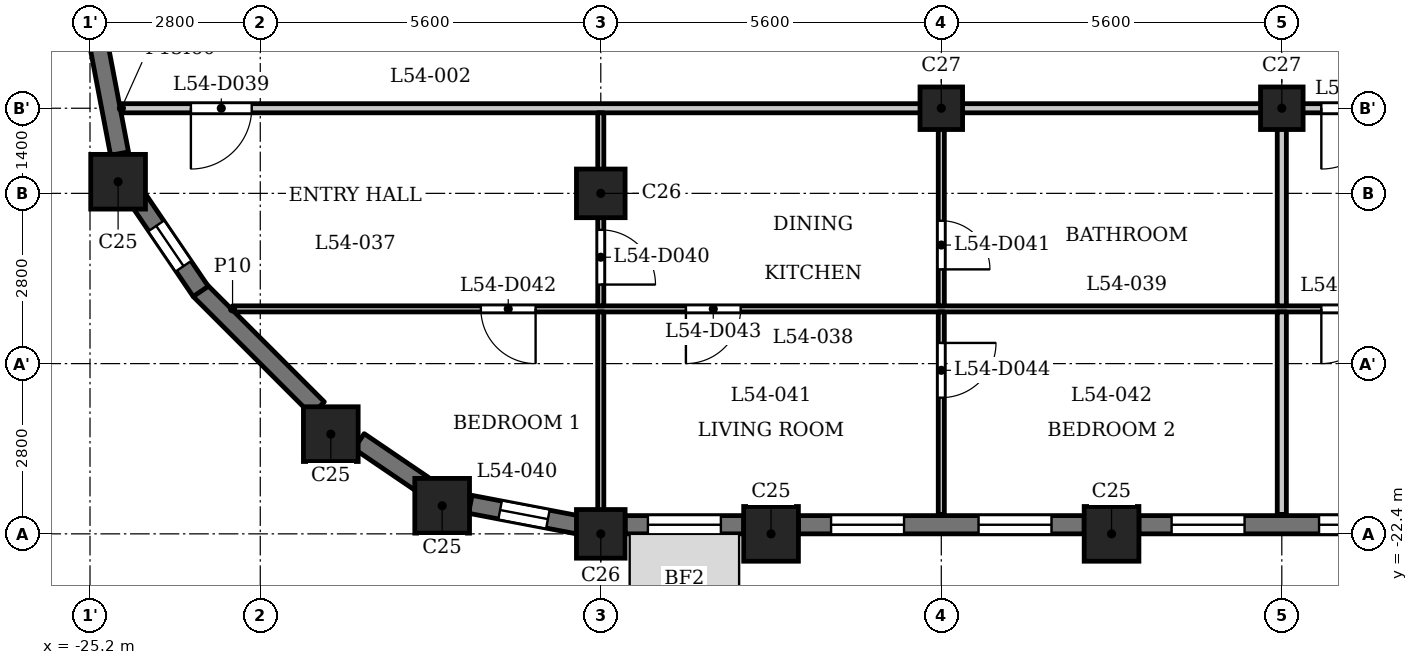
"""IFC4 building model, lengths in metres.
Left out: names, types, materials, properties, quantities, classifications, styles, units other than length and angle.
Written with IfcOpenShell. Run it as: python <this file> out.ifc"""

import sys

from ifc_helpers import new_model, si_unit, direction, frame, frame_2d, origin, origin_2d, place, context, subcontext, project, spatial, rectangle, extrude, element, fill, save


model = new_model("IFC4")
c1 = context("Model", 3, precision=1e-05, world=origin(), true_north=direction((0.0, 1.0)))
c2 = subcontext(c1, "Body", "Model", "MODEL_VIEW")
j1 = project(units=[si_unit("LENGTHUNIT", "METRE"), si_unit("PLANEANGLEUNIT", "RADIAN")], contexts=[c1])
p1 = place(None, origin())
s1 = spatial("IfcSite", under=j1, at=p1, CompositionType="ELEMENT")
p2 = place(p1, origin())
s2 = spatial("IfcBuilding", under=s1, at=p2, CompositionType="ELEMENT")
p3 = place(p2, frame((0.0, 0.0, 209.9)))
s3 = spatial("IfcBuildingStorey", under=s2, at=p3, CompositionType="ELEMENT", Elevation=209.9)
for number, where, z_axis, x_axis in (
    (1, (-19.409, -21.938, 0.0), (0.0, 0.0, 1.0), (1.0, 0.0, 0.0)),
    (2, (-14.0, -22.4, 0.0), (0.0, 0.0, 1.0), (1.0, 0.0, 0.0)),
    (3, (-8.4, -22.4, 0.0), (0.0, 0.0, 1.0), (1.0, 0.0, 0.0)),
    (4, (-24.738, -16.609, 0.0), (0.0, 0.0, 1.0), (1.0, 0.0, 0.0)),
    (5, (-21.24, -20.76, 0.0), (0.0, 0.0, 1.0), (1.0, 0.0, 0.0)),
):
    element("IfcColumn", number, at=place(p3, frame(where, z_axis=z_axis, x_axis=x_axis)), inside=s3, PredefinedType="COLUMN", context=c2, shape_type="SweptSolid", body=[
        extrude(rectangle(XDim=0.9, YDim=0.9, at=origin_2d()), origin(), (0.0, 0.0, 1.0), 3.5),
    ])
for number, where, z_axis, x_axis in (
    (6, (-16.8, -22.4, 0.0), (0.0, 0.0, 1.0), (1.0, 0.0, 0.0)),
    (7, (-16.8, -16.8, 0.0), (0.0, 0.0, 1.0), (1.0, 0.0, 0.0)),
):
    element("IfcColumn", number, at=place(p3, frame(where, z_axis=z_axis, x_axis=x_axis)), inside=s3, PredefinedType="COLUMN", context=c2, shape_type="SweptSolid", body=[
        extrude(rectangle(XDim=0.8, YDim=0.8, at=origin_2d()), origin(), (0.0, 0.0, 1.0), 3.5),
    ])
for number, where, z_axis, x_axis in (
    (8, (-11.2, -15.4, 0.0), (0.0, 0.0, 1.0), (1.0, 0.0, 0.0)),
    (9, (-5.6, -15.4, 0.0), (0.0, 0.0, 1.0), (1.0, 0.0, 0.0)),
):
    element("IfcColumn", number, at=place(p3, frame(where, z_axis=z_axis, x_axis=x_axis)), inside=s3, PredefinedType="COLUMN", context=c2, shape_type="SweptSolid", body=[
        extrude(rectangle(XDim=0.7, YDim=0.7, at=origin_2d()), origin(), (0.0, 0.0, 1.0), 3.5),
    ])
p4 = place(p3, frame((-23.397, -18.391, 0.0), z_axis=(0.0, 0.0, 1.0), x_axis=(0.707106781187, -0.707106781187, 0.0)))
e10 = element("IfcWall", 10, at=p4, inside=s3, PredefinedType="SOLIDWALL", context=c2, shape_type="SweptSolid", body=[
    extrude(rectangle(XDim=2.75, YDim=0.3, at=frame_2d((1.375, 0.0))), origin(), (0.0, 0.0, 1.0), 2.5),
])
p5 = place(p3, frame((-20.775, -20.876, 0.0), z_axis=(0.0, 0.0, 1.0), x_axis=(0.827075824828, -0.562090366388, 0.0)))
e11 = element("IfcWall", 11, at=p5, inside=s3, PredefinedType="SOLIDWALL", context=c2, shape_type="SweptSolid", body=[
    extrude(rectangle(XDim=1.277, YDim=0.3, at=frame_2d((0.638, 0.0))), origin(), (0.0, 0.0, 1.0), 2.5),
])
p6 = place(p3, frame((-18.946, -21.914, 0.0), z_axis=(0.0, 0.0, 1.0), x_axis=(0.98230529033, -0.187286722942, 0.0)))
e12 = element("IfcWall", 12, at=p6, inside=s3, PredefinedType="SOLIDWALL", context=c2, shape_type="SweptSolid", body=[
    extrude(rectangle(XDim=1.799, YDim=0.3, at=frame_2d((0.899, 0.0))), origin(), (0.0, 0.0, 1.0), 2.5),
])
p7 = place(p6, frame((0.5, 0.0, 0.6)))
e13 = element("IfcOpeningElement", 13, at=p7, cuts=e12, PredefinedType="OPENING", context=c2, shape_type="SweptSolid", body=[
    extrude(rectangle(XDim=0.8, YDim=1.55, at=frame_2d((0.4, 0.775))), frame((0.0, 0.16, 0.0), z_axis=(0.0, -1.0, 0.0), x_axis=(1.0, 0.0, 0.0)), (0.0, 0.0, 1.0), 0.32),
])
p8 = place(p3, frame((-16.4, -22.25, 0.0), z_axis=(0.0, 0.0, 1.0), x_axis=(1.0, 0.0, 0.0)))
e14 = element("IfcWall", 14, at=p8, inside=s3, PredefinedType="SOLIDWALL", context=c2, shape_type="SweptSolid", body=[
    extrude(rectangle(XDim=1.95, YDim=0.3, at=frame_2d((0.975, 0.0))), origin(), (0.0, 0.0, 1.0), 2.5),
])
p9 = place(p8, frame((0.375, 0.0, 0.6)))
e15 = element("IfcOpeningElement", 15, at=p9, cuts=e14, PredefinedType="OPENING", context=c2, shape_type="SweptSolid", body=[
    extrude(rectangle(XDim=1.2, YDim=1.55, at=frame_2d((0.6, 0.775))), frame((0.0, 0.16, 0.0), z_axis=(0.0, -1.0, 0.0), x_axis=(1.0, 0.0, 0.0)), (0.0, 0.0, 1.0), 0.32),
])
p10 = place(p3, frame((-13.55, -22.25, 0.0), z_axis=(0.0, 0.0, 1.0), x_axis=(1.0, 0.0, 0.0)))
e16 = element("IfcWall", 16, at=p10, inside=s3, PredefinedType="SOLIDWALL", context=c2, shape_type="SweptSolid", body=[
    extrude(rectangle(XDim=4.7, YDim=0.3, at=frame_2d((2.35, 0.0))), origin(), (0.0, 0.0, 1.0), 2.5),
])
p11 = place(p10, frame((0.538, 0.0, 0.6)))
e17 = element("IfcOpeningElement", 17, at=p11, cuts=e16, PredefinedType="OPENING", context=c2, shape_type="SweptSolid", body=[
    extrude(rectangle(XDim=1.2, YDim=1.55, at=frame_2d((0.6, 0.775))), frame((0.0, 0.16, 0.0), z_axis=(0.0, -1.0, 0.0), x_axis=(1.0, 0.0, 0.0)), (0.0, 0.0, 1.0), 0.32),
])
p12 = place(p10, frame((2.962, 0.0, 0.6)))
e18 = element("IfcOpeningElement", 18, at=p12, cuts=e16, PredefinedType="OPENING", context=c2, shape_type="SweptSolid", body=[
    extrude(rectangle(XDim=1.2, YDim=1.55, at=frame_2d((0.6, 0.775))), frame((0.0, 0.16, 0.0), z_axis=(0.0, -1.0, 0.0), x_axis=(1.0, 0.0, 0.0)), (0.0, 0.0, 1.0), 0.32),
])
p13 = place(p3, frame((-7.95, -22.25, 0.0), z_axis=(0.0, 0.0, 1.0), x_axis=(1.0, 0.0, 0.0)))
e19 = element("IfcWall", 19, at=p13, inside=s3, PredefinedType="SOLIDWALL", context=c2, shape_type="SweptSolid", body=[
    extrude(rectangle(XDim=4.7, YDim=0.3, at=frame_2d((2.35, 0.0))), origin(), (0.0, 0.0, 1.0), 2.5),
])
p14 = place(p13, frame((0.538, 0.0, 0.6)))
e20 = element("IfcOpeningElement", 20, at=p14, cuts=e19, PredefinedType="OPENING", context=c2, shape_type="SweptSolid", body=[
    extrude(rectangle(XDim=1.2, YDim=1.55, at=frame_2d((0.6, 0.775))), frame((0.0, 0.16, 0.0), z_axis=(0.0, -1.0, 0.0), x_axis=(1.0, 0.0, 0.0)), (0.0, 0.0, 1.0), 0.32),
])
p15 = place(p13, frame((2.962, 0.0, 0.6)))
e21 = element("IfcOpeningElement", 21, at=p15, cuts=e19, PredefinedType="OPENING", context=c2, shape_type="SweptSolid", body=[
    extrude(rectangle(XDim=1.2, YDim=1.55, at=frame_2d((0.6, 0.775))), frame((0.0, 0.16, 0.0), z_axis=(0.0, -1.0, 0.0), x_axis=(1.0, 0.0, 0.0)), (0.0, 0.0, 1.0), 0.32),
])
p16 = place(p3, frame((-25.053, -14.372, 0.0), z_axis=(0.0, 0.0, 1.0), x_axis=(0.187348135549, -0.982293579388, 0.0)))
e22 = element("IfcWall", 22, at=p16, inside=s3, PredefinedType="SOLIDWALL", context=c2, shape_type="SweptSolid", body=[
    extrude(rectangle(XDim=1.806, YDim=0.3, at=frame_2d((0.903, 0.0))), origin(), (0.0, 0.0, 1.0), 2.5),
])
p17 = place(p3, frame((-24.394, -16.919, 0.0), z_axis=(0.0, 0.0, 1.0), x_axis=(0.562040093569, -0.827109988588, 0.0)))
e23 = element("IfcWall", 23, at=p17, inside=s3, PredefinedType="SOLIDWALL", context=c2, shape_type="SweptSolid", body=[
    extrude(rectangle(XDim=1.806, YDim=0.3, at=frame_2d((0.903, 0.0))), origin(), (0.0, 0.0, 1.0), 2.5),
])
p18 = place(p17, frame((0.503, 0.0, 0.6)))
e24 = element("IfcOpeningElement", 24, at=p18, cuts=e23, PredefinedType="OPENING", context=c2, shape_type="SweptSolid", body=[
    extrude(rectangle(XDim=0.8, YDim=1.55, at=frame_2d((0.4, 0.775))), frame((0.0, 0.16, 0.0), z_axis=(0.0, -1.0, 0.0), x_axis=(1.0, 0.0, 0.0)), (0.0, 0.0, 1.0), 0.32),
])
p19 = place(p3, frame((-22.856, -18.7, 0.0), z_axis=(0.0, 0.0, 1.0), x_axis=(1.0, 0.0, 0.0)))
e25 = element("IfcWall", 25, at=p19, inside=s3, PredefinedType="PARTITIONING", context=c2, shape_type="SweptSolid", body=[
    extrude(rectangle(XDim=45.711, YDim=0.1, at=frame_2d((22.856, 0.0))), origin(), (0.0, 0.0, 1.0), 3.2),
])
p20 = place(p19, frame((4.084, 0.0, 0.0)))
e26 = element("IfcOpeningElement", 26, at=p20, cuts=e25, PredefinedType="OPENING", context=c2, shape_type="SweptSolid", body=[
    extrude(rectangle(XDim=0.9, YDim=2.1, at=frame_2d((0.45, 1.05))), frame((0.0, 0.06, 0.0), z_axis=(0.0, -1.0, 0.0), x_axis=(1.0, 0.0, 0.0)), (0.0, 0.0, 1.0), 0.12),
])
p21 = place(p19, frame((7.456, 0.0, 0.0)))
e27 = element("IfcOpeningElement", 27, at=p21, cuts=e25, PredefinedType="OPENING", context=c2, shape_type="SweptSolid", body=[
    extrude(rectangle(XDim=0.9, YDim=2.1, at=frame_2d((0.45, 1.05))), frame((0.0, 0.06, 0.0), z_axis=(0.0, -1.0, 0.0), x_axis=(1.0, 0.0, 0.0)), (0.0, 0.0, 1.0), 0.12),
])
p22 = place(p19, frame((23.506, 0.0, 0.0)))
e28 = element("IfcOpeningElement", 28, at=p22, cuts=e25, PredefinedType="OPENING", context=c2, shape_type="SweptSolid", body=[
    extrude(rectangle(XDim=0.8, YDim=2.1, at=frame_2d((0.4, 1.05))), frame((0.0, 0.06, 0.0), z_axis=(0.0, -1.0, 0.0), x_axis=(1.0, 0.0, 0.0)), (0.0, 0.0, 1.0), 0.12),
])
p23 = place(p19, frame((17.906, 0.0, 0.0)))
e29 = element("IfcOpeningElement", 29, at=p23, cuts=e25, PredefinedType="OPENING", context=c2, shape_type="SweptSolid", body=[
    extrude(rectangle(XDim=0.9, YDim=2.1, at=frame_2d((0.45, 1.05))), frame((0.0, 0.06, 0.0), z_axis=(0.0, -1.0, 0.0), x_axis=(1.0, 0.0, 0.0)), (0.0, 0.0, 1.0), 0.12),
])
p24 = place(p19, frame((43.806, 0.0, 0.0)))
e30 = element("IfcOpeningElement", 30, at=p24, cuts=e25, PredefinedType="OPENING", context=c2, shape_type="SweptSolid", body=[
    extrude(rectangle(XDim=0.9, YDim=2.1, at=frame_2d((0.45, 1.05))), frame((0.0, 0.06, 0.0), z_axis=(0.0, -1.0, 0.0), x_axis=(1.0, 0.0, 0.0)), (0.0, 0.0, 1.0), 0.12),
])
p25 = place(p19, frame((34.706, 0.0, 0.0)))
e31 = element("IfcOpeningElement", 31, at=p25, cuts=e25, PredefinedType="OPENING", context=c2, shape_type="SweptSolid", body=[
    extrude(rectangle(XDim=0.9, YDim=2.1, at=frame_2d((0.45, 1.05))), frame((0.0, 0.06, 0.0), z_axis=(0.0, -1.0, 0.0), x_axis=(1.0, 0.0, 0.0)), (0.0, 0.0, 1.0), 0.12),
])
p26 = place(p3, frame((-24.684, -15.4, 0.0), z_axis=(0.0, 0.0, 1.0), x_axis=(1.0, 0.0, 0.0)))
e32 = element("IfcWall", 32, at=p26, inside=s3, PredefinedType="PARTITIONING", context=c2, shape_type="SweptSolid", body=[
    extrude(rectangle(XDim=49.368, YDim=0.15, at=frame_2d((24.684, 0.0))), origin(), (0.0, 0.0, 1.0), 3.2),
])
p27 = place(p26, frame((1.143, 0.0, 0.0)))
e33 = element("IfcOpeningElement", 33, at=p27, cuts=e32, PredefinedType="OPENING", context=c2, shape_type="SweptSolid", body=[
    extrude(rectangle(XDim=1.0, YDim=2.1, at=frame_2d((0.5, 1.05))), frame((0.0, 0.085, 0.0), z_axis=(0.0, -1.0, 0.0), x_axis=(1.0, 0.0, 0.0)), (0.0, 0.0, 1.0), 0.17),
])
p28 = place(p26, frame((19.734, 0.0, 0.0)))
e34 = element("IfcOpeningElement", 34, at=p28, cuts=e32, PredefinedType="OPENING", context=c2, shape_type="SweptSolid", body=[
    extrude(rectangle(XDim=1.0, YDim=2.1, at=frame_2d((0.5, 1.05))), frame((0.0, 0.085, 0.0), z_axis=(0.0, -1.0, 0.0), x_axis=(1.0, 0.0, 0.0)), (0.0, 0.0, 1.0), 0.17),
])
p29 = place(p26, frame((42.134, 0.0, 0.0)))
e35 = element("IfcOpeningElement", 35, at=p29, cuts=e32, PredefinedType="OPENING", context=c2, shape_type="SweptSolid", body=[
    extrude(rectangle(XDim=1.0, YDim=2.1, at=frame_2d((0.5, 1.05))), frame((0.0, 0.085, 0.0), z_axis=(0.0, -1.0, 0.0), x_axis=(1.0, 0.0, 0.0)), (0.0, 0.0, 1.0), 0.17),
])
p30 = place(p3, frame((-16.8, -22.31, 0.0), z_axis=(0.0, 0.0, 1.0), x_axis=(0.0, 1.0, 0.0)))
e36 = element("IfcWall", 36, at=p30, inside=s3, PredefinedType="PARTITIONING", context=c2, shape_type="SweptSolid", body=[
    extrude(rectangle(XDim=3.56, YDim=0.1, at=frame_2d((1.78, 0.0))), origin(), (0.0, 0.0, 1.0), 2.55),
])
p31 = place(p3, frame((-16.8, -18.65, 0.0), z_axis=(0.0, 0.0, 1.0), x_axis=(0.0, 1.0, 0.0)))
e37 = element("IfcWall", 37, at=p31, inside=s3, PredefinedType="PARTITIONING", context=c2, shape_type="SweptSolid", body=[
    extrude(rectangle(XDim=3.175, YDim=0.1, at=frame_2d((1.587, 0.0))), origin(), (0.0, 0.0, 1.0), 2.55),
])
p32 = place(p31, frame((0.35, 0.0, 0.0)))
e38 = element("IfcOpeningElement", 38, at=p32, cuts=e37, PredefinedType="OPENING", context=c2, shape_type="SweptSolid", body=[
    extrude(rectangle(XDim=0.9, YDim=2.1, at=frame_2d((0.45, 1.05))), frame((0.0, 0.06, 0.0), z_axis=(0.0, -1.0, 0.0), x_axis=(1.0, 0.0, 0.0)), (0.0, 0.0, 1.0), 0.12),
])
p33 = place(p3, frame((-11.2, -22.08, 0.0), z_axis=(0.0, 0.0, 1.0), x_axis=(0.0, 1.0, 0.0)))
e39 = element("IfcWall", 39, at=p33, inside=s3, PredefinedType="PARTITIONING", context=c2, shape_type="SweptSolid", body=[
    extrude(rectangle(XDim=3.33, YDim=0.1, at=frame_2d((1.665, 0.0))), origin(), (0.0, 0.0, 1.0), 3.2),
])
p34 = place(p33, frame((1.92, 0.0, 0.0)))
e40 = element("IfcOpeningElement", 40, at=p34, cuts=e39, PredefinedType="OPENING", context=c2, shape_type="SweptSolid", body=[
    extrude(rectangle(XDim=0.9, YDim=2.1, at=frame_2d((0.45, 1.05))), frame((0.0, 0.06, 0.0), z_axis=(0.0, -1.0, 0.0), x_axis=(1.0, 0.0, 0.0)), (0.0, 0.0, 1.0), 0.12),
])
p35 = place(p3, frame((-11.2, -18.65, 0.0), z_axis=(0.0, 0.0, 1.0), x_axis=(0.0, 1.0, 0.0)))
e41 = element("IfcWall", 41, at=p35, inside=s3, PredefinedType="PARTITIONING", context=c2, shape_type="SweptSolid", body=[
    extrude(rectangle(XDim=3.175, YDim=0.1, at=frame_2d((1.587, 0.0))), origin(), (0.0, 0.0, 1.0), 3.2),
])
p36 = place(p35, frame((0.6, 0.0, 0.0)))
e42 = element("IfcOpeningElement", 42, at=p36, cuts=e41, PredefinedType="OPENING", context=c2, shape_type="SweptSolid", body=[
    extrude(rectangle(XDim=0.8, YDim=2.1, at=frame_2d((0.4, 1.05))), frame((0.0, 0.06, 0.0), z_axis=(0.0, -1.0, 0.0), x_axis=(1.0, 0.0, 0.0)), (0.0, 0.0, 1.0), 0.12),
])
p37 = place(p3, frame((-5.6, -22.08, 0.0), z_axis=(0.0, 0.0, 1.0), x_axis=(0.0, 1.0, 0.0)))
e43 = element("IfcWall", 43, at=p37, inside=s3, PredefinedType="PARTITIONING", context=c2, shape_type="SweptSolid", body=[
    extrude(rectangle(XDim=3.33, YDim=0.15, at=frame_2d((1.665, 0.0))), origin(), (0.0, 0.0, 1.0), 3.2),
])
p38 = place(p3, frame((-5.6, -18.65, 0.0), z_axis=(0.0, 0.0, 1.0), x_axis=(0.0, 1.0, 0.0)))
e44 = element("IfcWall", 44, at=p38, inside=s3, PredefinedType="PARTITIONING", context=c2, shape_type="SweptSolid", body=[
    extrude(rectangle(XDim=3.175, YDim=0.15, at=frame_2d((1.587, 0.0))), origin(), (0.0, 0.0, 1.0), 3.2),
])
p39 = place(p27, origin())
e45 = element("IfcDoor", 45, at=p39, inside=s3, OperationType="SINGLE_SWING_LEFT", PredefinedType="DOOR", context=c2, shape_type="SweptSolid", body=[
    extrude(rectangle(XDim=1.0, YDim=2.1, at=frame_2d((0.5, 1.05))), frame((0.0, 0.025, 0.0), z_axis=(0.0, -1.0, 0.0), x_axis=(1.0, 0.0, 0.0)), (0.0, 0.0, 1.0), 0.05),
])
fill(e33, e45)
p40 = place(p32, origin())
e46 = element("IfcDoor", 46, at=p40, inside=s3, OperationType="SINGLE_SWING_LEFT", PredefinedType="DOOR", context=c2, shape_type="SweptSolid", body=[
    extrude(rectangle(XDim=0.9, YDim=2.1, at=frame_2d((0.45, 1.05))), frame((0.0, 0.025, 0.0), z_axis=(0.0, -1.0, 0.0), x_axis=(1.0, 0.0, 0.0)), (0.0, 0.0, 1.0), 0.05),
])
fill(e38, e46)
p41 = place(p36, origin())
e47 = element("IfcDoor", 47, at=p41, inside=s3, OperationType="SINGLE_SWING_LEFT", PredefinedType="DOOR", context=c2, shape_type="SweptSolid", body=[
    extrude(rectangle(XDim=0.8, YDim=2.1, at=frame_2d((0.4, 1.05))), frame((0.0, 0.025, 0.0), z_axis=(0.0, -1.0, 0.0), x_axis=(1.0, 0.0, 0.0)), (0.0, 0.0, 1.0), 0.05),
])
fill(e42, e47)
p42 = place(p20, origin())
e48 = element("IfcDoor", 48, at=p42, inside=s3, OperationType="SINGLE_SWING_RIGHT", PredefinedType="DOOR", context=c2, shape_type="SweptSolid", body=[
    extrude(rectangle(XDim=0.9, YDim=2.1, at=frame_2d((0.45, 1.05))), frame((0.0, 0.025, 0.0), z_axis=(0.0, -1.0, 0.0), x_axis=(1.0, 0.0, 0.0)), (0.0, 0.0, 1.0), 0.05),
])
fill(e26, e48)
p43 = place(p21, origin())
e49 = element("IfcDoor", 49, at=p43, inside=s3, OperationType="SINGLE_SWING_LEFT", PredefinedType="DOOR", context=c2, shape_type="SweptSolid", body=[
    extrude(rectangle(XDim=0.9, YDim=2.1, at=frame_2d((0.45, 1.05))), frame((0.0, 0.025, 0.0), z_axis=(0.0, -1.0, 0.0), x_axis=(1.0, 0.0, 0.0)), (0.0, 0.0, 1.0), 0.05),
])
fill(e27, e49)
p44 = place(p34, origin())
e50 = element("IfcDoor", 50, at=p44, inside=s3, OperationType="SINGLE_SWING_RIGHT", PredefinedType="DOOR", context=c2, shape_type="SweptSolid", body=[
    extrude(rectangle(XDim=0.9, YDim=2.1, at=frame_2d((0.45, 1.05))), frame((0.0, 0.025, 0.0), z_axis=(0.0, -1.0, 0.0), x_axis=(1.0, 0.0, 0.0)), (0.0, 0.0, 1.0), 0.05),
])
fill(e40, e50)
p45 = place(p28, origin())
e51 = element("IfcDoor", 51, at=p45, inside=s3, OperationType="SINGLE_SWING_LEFT", PredefinedType="DOOR", context=c2, shape_type="SweptSolid", body=[
    extrude(rectangle(XDim=1.0, YDim=2.1, at=frame_2d((0.5, 1.05))), frame((0.0, 0.025, 0.0), z_axis=(0.0, -1.0, 0.0), x_axis=(1.0, 0.0, 0.0)), (0.0, 0.0, 1.0), 0.05),
])
fill(e34, e51)
p46 = place(p23, origin())
e52 = element("IfcDoor", 52, at=p46, inside=s3, OperationType="SINGLE_SWING_LEFT", PredefinedType="DOOR", context=c2, shape_type="SweptSolid", body=[
    extrude(rectangle(XDim=0.9, YDim=2.1, at=frame_2d((0.45, 1.05))), frame((0.0, 0.025, 0.0), z_axis=(0.0, -1.0, 0.0), x_axis=(1.0, 0.0, 0.0)), (0.0, 0.0, 1.0), 0.05),
])
fill(e29, e52)
p47 = place(p7, origin())
e53 = element("IfcWindow", 53, at=p47, inside=s3, PartitioningType="SINGLE_PANEL", PredefinedType="WINDOW", context=c2, shape_type="SweptSolid", body=[
    extrude(rectangle(XDim=0.8, YDim=1.55, at=frame_2d((0.4, 0.775))), frame((0.0, 0.03, 0.0), z_axis=(0.0, -1.0, 0.0), x_axis=(1.0, 0.0, 0.0)), (0.0, 0.0, 1.0), 0.06),
])
fill(e13, e53)
p48 = place(p9, origin())
e54 = element("IfcWindow", 54, at=p48, inside=s3, PartitioningType="SINGLE_PANEL", PredefinedType="WINDOW", context=c2, shape_type="SweptSolid", body=[
    extrude(rectangle(XDim=1.2, YDim=1.55, at=frame_2d((0.6, 0.775))), frame((0.0, 0.03, 0.0), z_axis=(0.0, -1.0, 0.0), x_axis=(1.0, 0.0, 0.0)), (0.0, 0.0, 1.0), 0.06),
])
fill(e15, e54)
p49 = place(p11, origin())
e55 = element("IfcWindow", 55, at=p49, inside=s3, PartitioningType="SINGLE_PANEL", PredefinedType="WINDOW", context=c2, shape_type="SweptSolid", body=[
    extrude(rectangle(XDim=1.2, YDim=1.55, at=frame_2d((0.6, 0.775))), frame((0.0, 0.03, 0.0), z_axis=(0.0, -1.0, 0.0), x_axis=(1.0, 0.0, 0.0)), (0.0, 0.0, 1.0), 0.06),
])
fill(e17, e55)
p50 = place(p12, origin())
e56 = element("IfcWindow", 56, at=p50, inside=s3, PartitioningType="SINGLE_PANEL", PredefinedType="WINDOW", context=c2, shape_type="SweptSolid", body=[
    extrude(rectangle(XDim=1.2, YDim=1.55, at=frame_2d((0.6, 0.775))), frame((0.0, 0.03, 0.0), z_axis=(0.0, -1.0, 0.0), x_axis=(1.0, 0.0, 0.0)), (0.0, 0.0, 1.0), 0.06),
])
fill(e18, e56)
p51 = place(p14, origin())
e57 = element("IfcWindow", 57, at=p51, inside=s3, PartitioningType="SINGLE_PANEL", PredefinedType="WINDOW", context=c2, shape_type="SweptSolid", body=[
    extrude(rectangle(XDim=1.2, YDim=1.55, at=frame_2d((0.6, 0.775))), frame((0.0, 0.03, 0.0), z_axis=(0.0, -1.0, 0.0), x_axis=(1.0, 0.0, 0.0)), (0.0, 0.0, 1.0), 0.06),
])
fill(e20, e57)
p52 = place(p15, origin())
e58 = element("IfcWindow", 58, at=p52, inside=s3, PartitioningType="SINGLE_PANEL", PredefinedType="WINDOW", context=c2, shape_type="SweptSolid", body=[
    extrude(rectangle(XDim=1.2, YDim=1.55, at=frame_2d((0.6, 0.775))), frame((0.0, 0.03, 0.0), z_axis=(0.0, -1.0, 0.0), x_axis=(1.0, 0.0, 0.0)), (0.0, 0.0, 1.0), 0.06),
])
fill(e21, e58)
p53 = place(p18, origin())
e59 = element("IfcWindow", 59, at=p53, inside=s3, PartitioningType="SINGLE_PANEL", PredefinedType="WINDOW", context=c2, shape_type="SweptSolid", body=[
    extrude(rectangle(XDim=0.8, YDim=1.55, at=frame_2d((0.4, 0.775))), frame((0.0, 0.03, 0.0), z_axis=(0.0, -1.0, 0.0), x_axis=(1.0, 0.0, 0.0)), (0.0, 0.0, 1.0), 0.06),
])
fill(e24, e59)
save(model, sys.argv[1])
